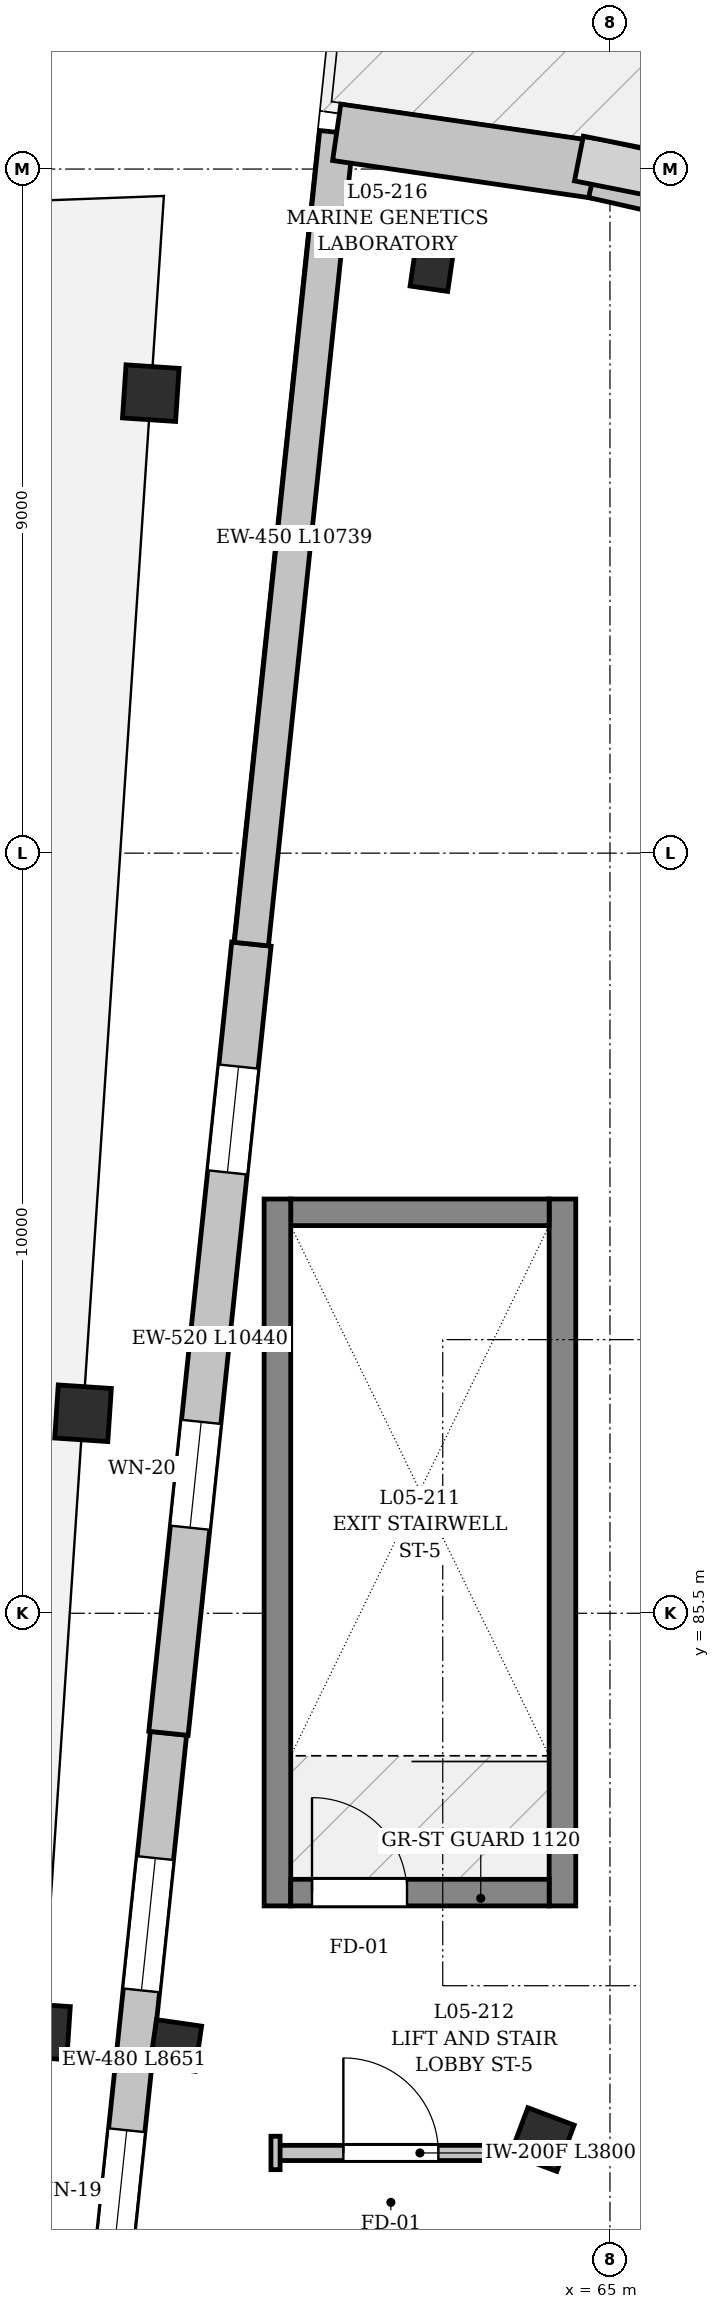
"""IFC4 building model, lengths in metres.
Left out: names, types, materials, properties, quantities, classifications, styles, units other than length and angle.
Written with IfcOpenShell. Run it as: python <this file> out.ifc"""

import sys

from ifc_helpers import new_model, si_unit, direction, frame, frame_2d, origin, origin_2d, place, context, subcontext, project, spatial, rectangle, extrude, element, fill, save


model = new_model("IFC4")
c1 = context("Model", 3, precision=1e-05, world=origin(), true_north=direction((0.0, 1.0)))
c2 = subcontext(c1, "Body", "Model", "MODEL_VIEW")
j1 = project(units=[si_unit("LENGTHUNIT", "METRE"), si_unit("PLANEANGLEUNIT", "RADIAN")], contexts=[c1])
p1 = place(None, origin())
s1 = spatial("IfcSite", under=j1, at=p1, CompositionType="ELEMENT")
p2 = place(p1, origin())
s2 = spatial("IfcBuilding", under=s1, at=p2, CompositionType="ELEMENT")
p3 = place(p2, frame((0.0, 0.0, 19.8)))
s3 = spatial("IfcBuildingStorey", under=s2, at=p3, CompositionType="ELEMENT", Elevation=19.8)
p4 = place(p3, frame((64.11, 78.576, 0.0), z_axis=(0.0, 0.0, 1.0), x_axis=(0.351841648405, 0.936059535739, 0.0)))
e1 = element("IfcColumn", 1, at=p4, inside=s3, PredefinedType="COLUMN", context=c2, shape_type="SweptSolid", body=[
    extrude(rectangle(XDim=0.65, YDim=0.65, at=origin_2d()), origin(), (0.0, 0.0, 1.0), 4.58),
])
p5 = place(p3, frame((59.288, 79.814, 0.0), z_axis=(0.0, 0.0, 1.0), x_axis=(0.142628933706, 0.989776230908, 0.0)))
e2 = element("IfcColumn", 2, at=p5, inside=s3, PredefinedType="COLUMN", context=c2, shape_type="SweptSolid", body=[
    extrude(rectangle(XDim=0.6, YDim=0.6, at=origin_2d()), origin(), (0.0, 0.0, 1.0), 4.58),
])
p6 = place(p3, frame((62.654, 103.173, 0.0), z_axis=(0.0, 0.0, 1.0), x_axis=(0.142628933706, 0.989776230908, 0.0)))
e3 = element("IfcColumn", 3, at=p6, inside=s3, PredefinedType="COLUMN", context=c2, shape_type="SweptSolid", body=[
    extrude(rectangle(XDim=0.5, YDim=0.5, at=origin_2d()), origin(), (0.0, 0.0, 1.0), 4.58),
])
p7 = place(p3, frame((58.959, 101.552, -0.22), z_axis=(0.0, 0.0, 1.0), x_axis=(0.0662739004, 0.997801468292, 0.0)))
e4 = element("IfcColumn", 4, at=p7, inside=s3, PredefinedType="COLUMN", context=c2, shape_type="SweptSolid", body=[
    extrude(rectangle(XDim=0.7, YDim=0.7, at=origin_2d()), origin(), (0.0, 0.0, 1.0), 3.153),
])
p8 = place(p3, frame((57.528, 79.999, -0.22), z_axis=(0.0, 0.0, 1.0), x_axis=(0.0662739004, 0.997801468292, 0.0)))
e5 = element("IfcColumn", 5, at=p8, inside=s3, PredefinedType="COLUMN", context=c2, shape_type="SweptSolid", body=[
    extrude(rectangle(XDim=0.7, YDim=0.7, at=origin_2d()), origin(), (0.0, 0.0, 1.0), 0.845),
])
p9 = place(p3, frame((58.068, 88.131, -0.22), z_axis=(0.0, 0.0, 1.0), x_axis=(0.0662739004, 0.997801468292, 0.0)))
e6 = element("IfcColumn", 6, at=p9, inside=s3, PredefinedType="COLUMN", context=c2, shape_type="SweptSolid", body=[
    extrude(rectangle(XDim=0.7, YDim=0.7, at=origin_2d()), origin(), (0.0, 0.0, 1.0), 1.716),
])
p10 = place(p2, frame((0.0, 0.0, 15.0)))
s4 = spatial("IfcBuildingStorey", under=s2, at=p10, CompositionType="ELEMENT", Elevation=15.0)
p11 = place(p10, frame((60.37, 102.978, 0.0), z_axis=(0.0, 0.0, 1.0), x_axis=(-0.104525478139, -0.994522209113, 0.0)))
e7 = element("IfcWall", 7, at=p11, inside=s4, PredefinedType="SOLIDWALL", context=c2, shape_type="SweptSolid", body=[
    extrude(rectangle(XDim=11.328, YDim=0.48, at=frame_2d((5.664, 0.0))), origin(), (0.0, 0.0, 1.0), 6.833),
])
p12 = place(p3, frame((58.287, 75.317, 0.0), z_axis=(0.0, 0.0, 1.0), x_axis=(0.104509954637, 0.99452384053, 0.0)))
e8 = element("IfcWall", 8, at=p12, inside=s3, PredefinedType="SOLIDWALL", context=c2, shape_type="SweptSolid", body=[
    extrude(rectangle(XDim=8.65, YDim=0.48, at=frame_2d((4.325, 0.0))), origin(), (0.0, 0.0, 1.0), 5.19),
])
p13 = place(p12, frame((1.65, 0.0, 0.9)))
e9 = element("IfcOpeningElement", 9, at=p13, cuts=e8, PredefinedType="OPENING", context=c2, shape_type="SweptSolid", body=[
    extrude(rectangle(XDim=1.75, YDim=1.85, at=frame_2d((0.875, 0.925))), frame((0.0, 0.25, 0.0), z_axis=(0.0, -1.0, 0.0), x_axis=(1.0, 0.0, 0.0)), (0.0, 0.0, 1.0), 0.5),
])
p14 = place(p12, frame((5.25, 0.0, 0.9)))
e10 = element("IfcOpeningElement", 10, at=p14, cuts=e8, PredefinedType="OPENING", context=c2, shape_type="SweptSolid", body=[
    extrude(rectangle(XDim=1.75, YDim=1.85, at=frame_2d((0.875, 0.925))), frame((0.0, 0.25, 0.0), z_axis=(0.0, -1.0, 0.0), x_axis=(1.0, 0.0, 0.0)), (0.0, 0.0, 1.0), 0.5),
])
p15 = place(p3, frame((59.191, 83.92, 0.0), z_axis=(0.0, 0.0, 1.0), x_axis=(0.10452654069, 0.994522097437, 0.0)))
e11 = element("IfcWall", 11, at=p15, inside=s3, PredefinedType="SOLIDWALL", context=c2, shape_type="SweptSolid", body=[
    extrude(rectangle(XDim=10.44, YDim=0.52, at=frame_2d((5.22, 0.0))), origin(), (0.0, 0.0, 1.0), 5.475),
])
p16 = place(p15, frame((2.72, 0.0, 0.9)))
e12 = element("IfcOpeningElement", 12, at=p16, cuts=e11, PredefinedType="OPENING", context=c2, shape_type="SweptSolid", body=[
    extrude(rectangle(XDim=1.4, YDim=2.05, at=frame_2d((0.7, 1.025))), frame((0.0, 0.27, 0.0), z_axis=(0.0, -1.0, 0.0), x_axis=(1.0, 0.0, 0.0)), (0.0, 0.0, 1.0), 0.54),
])
p17 = place(p15, frame((7.42, 0.0, 0.9)))
e13 = element("IfcOpeningElement", 13, at=p17, cuts=e11, PredefinedType="OPENING", context=c2, shape_type="SweptSolid", body=[
    extrude(rectangle(XDim=1.4, YDim=2.05, at=frame_2d((0.7, 1.025))), frame((0.0, 0.27, 0.0), z_axis=(0.0, -1.0, 0.0), x_axis=(1.0, 0.0, 0.0)), (0.0, 0.0, 1.0), 0.54),
])
p18 = place(p3, frame((60.283, 94.304, 0.0), z_axis=(0.0, 0.0, 1.0), x_axis=(0.104535666462, 0.994521138256, 0.0)))
e14 = element("IfcWall", 14, at=p18, inside=s3, PredefinedType="SOLIDWALL", context=c2, shape_type="SweptSolid", body=[
    extrude(rectangle(XDim=10.739, YDim=0.45, at=frame_2d((5.369, 0.0))), origin(), (0.0, 0.0, 1.0), 5.85),
])
p19 = place(p3, frame((61.405, 104.983, 0.0), z_axis=(0.0, 0.0, 1.0), x_axis=(0.989654305804, -0.143472488666, 0.0)))
e15 = element("IfcWall", 15, at=p19, inside=s3, PredefinedType="SOLIDWALL", context=c2, shape_type="SweptSolid", body=[
    extrude(rectangle(XDim=3.432, YDim=0.75, at=frame_2d((1.716, 0.0))), origin(), (0.0, 0.0, 1.0), 4.875),
])
p20 = place(p3, frame((64.802, 104.491, 0.0), z_axis=(0.0, 0.0, 1.0), x_axis=(0.975346772392, -0.220677759604, 0.0)))
e16 = element("IfcWall", 16, at=p20, inside=s3, PredefinedType="SOLIDWALL", context=c2, shape_type="SweptSolid", body=[
    extrude(rectangle(XDim=3.792, YDim=0.75, at=frame_2d((1.896, 0.0))), origin(), (0.0, 0.0, 1.0), 6.237),
])
p21 = place(p20, frame((1.071, 0.0, 0.0)))
e17 = element("IfcOpeningElement", 17, at=p21, cuts=e16, PredefinedType="OPENING", context=c2, shape_type="SweptSolid", body=[
    extrude(rectangle(XDim=1.65, YDim=2.4, at=frame_2d((0.825, 1.2))), frame((0.0, 0.385, 0.0), z_axis=(0.0, -1.0, 0.0), x_axis=(1.0, 0.0, 0.0)), (0.0, 0.0, 1.0), 0.77),
])
p22 = place(p3, frame((64.375, 81.65, 0.0), z_axis=(0.0, 0.0, 1.0), x_axis=(0.0, 1.0, 0.0)))
e18 = element("IfcWall", 18, at=p22, inside=s3, PredefinedType="SHEAR", context=c2, shape_type="SweptSolid", body=[
    extrude(rectangle(XDim=9.3, YDim=0.35, at=frame_2d((4.65, 0.0))), origin(), (0.0, 0.0, 1.0), 3.6),
])
p23 = place(p3, frame((64.2, 90.775, 0.0), z_axis=(0.0, 0.0, 1.0), x_axis=(-1.0, 0.0, 0.0)))
e19 = element("IfcWall", 19, at=p23, inside=s3, PredefinedType="SHEAR", context=c2, shape_type="SweptSolid", body=[
    extrude(rectangle(XDim=3.4, YDim=0.35, at=frame_2d((1.7, 0.0))), origin(), (0.0, 0.0, 1.0), 3.6),
])
p24 = place(p3, frame((60.625, 90.95, 0.0), z_axis=(0.0, 0.0, 1.0), x_axis=(0.0, -1.0, 0.0)))
e20 = element("IfcWall", 20, at=p24, inside=s3, PredefinedType="SHEAR", context=c2, shape_type="SweptSolid", body=[
    extrude(rectangle(XDim=9.3, YDim=0.35, at=frame_2d((4.65, 0.0))), origin(), (0.0, 0.0, 1.0), 3.6),
])
p25 = place(p3, frame((60.8, 81.825, 0.0), z_axis=(0.0, 0.0, 1.0), x_axis=(1.0, 0.0, 0.0)))
e21 = element("IfcWall", 21, at=p25, inside=s3, PredefinedType="SHEAR", context=c2, shape_type="SweptSolid", body=[
    extrude(rectangle(XDim=3.4, YDim=0.35, at=frame_2d((1.7, 0.0))), origin(), (0.0, 0.0, 1.0), 3.6),
])
p26 = place(p25, frame((0.28, 0.0, 0.0)))
e22 = element("IfcOpeningElement", 22, at=p26, cuts=e21, PredefinedType="OPENING", context=c2, shape_type="SweptSolid", body=[
    extrude(rectangle(XDim=1.25, YDim=2.2, at=frame_2d((0.625, 1.1))), frame((0.0, 0.185, 0.0), z_axis=(0.0, -1.0, 0.0), x_axis=(1.0, 0.0, 0.0)), (0.0, 0.0, 1.0), 0.37),
])
p27 = place(p3, frame((60.6, 78.4, 0.0), z_axis=(0.0, 0.0, 1.0), x_axis=(1.0, 0.0, 0.0)))
e23 = element("IfcWall", 23, at=p27, inside=s3, PredefinedType="PARTITIONING", context=c2, shape_type="SweptSolid", body=[
    extrude(rectangle(XDim=3.8, YDim=0.2, at=frame_2d((1.9, 0.0))), origin(), (0.0, 0.0, 1.0), 3.55),
])
p28 = place(p27, frame((0.893, 0.0, 0.0)))
e24 = element("IfcOpeningElement", 24, at=p28, cuts=e23, PredefinedType="OPENING", context=c2, shape_type="SweptSolid", body=[
    extrude(rectangle(XDim=1.25, YDim=2.2, at=frame_2d((0.625, 1.1))), frame((0.0, 0.11, 0.0), z_axis=(0.0, -1.0, 0.0), x_axis=(1.0, 0.0, 0.0)), (0.0, 0.0, 1.0), 0.22),
])
p29 = place(p3, frame((60.6, 78.18, 0.0), z_axis=(0.0, 0.0, 1.0), x_axis=(0.0, 1.0, 0.0)))
e25 = element("IfcWall", 25, at=p29, inside=s3, PredefinedType="PARTITIONING", context=c2, shape_type="SweptSolid", body=[
    extrude(rectangle(XDim=0.44, YDim=0.12, at=frame_2d((0.22, 0.0))), origin(), (0.0, 0.0, 1.0), 3.55),
])
p30 = place(p13, origin())
e26 = element("IfcWindow", 26, at=p30, inside=s3, PartitioningType="DOUBLE_PANEL_VERTICAL", PredefinedType="WINDOW", context=c2, shape_type="SweptSolid", body=[
    extrude(rectangle(XDim=1.75, YDim=1.85, at=frame_2d((0.875, 0.925))), frame((0.0, 0.03, 0.0), z_axis=(0.0, -1.0, 0.0), x_axis=(1.0, 0.0, 0.0)), (0.0, 0.0, 1.0), 0.06),
])
fill(e9, e26)
p31 = place(p14, origin())
e27 = element("IfcWindow", 27, at=p31, inside=s3, PartitioningType="DOUBLE_PANEL_VERTICAL", PredefinedType="WINDOW", context=c2, shape_type="SweptSolid", body=[
    extrude(rectangle(XDim=1.75, YDim=1.85, at=frame_2d((0.875, 0.925))), frame((0.0, 0.03, 0.0), z_axis=(0.0, -1.0, 0.0), x_axis=(1.0, 0.0, 0.0)), (0.0, 0.0, 1.0), 0.06),
])
fill(e10, e27)
p32 = place(p16, origin())
e28 = element("IfcWindow", 28, at=p32, inside=s3, PartitioningType="DOUBLE_PANEL_VERTICAL", PredefinedType="WINDOW", context=c2, shape_type="SweptSolid", body=[
    extrude(rectangle(XDim=1.4, YDim=2.05, at=frame_2d((0.7, 1.025))), frame((0.0, 0.03, 0.0), z_axis=(0.0, -1.0, 0.0), x_axis=(1.0, 0.0, 0.0)), (0.0, 0.0, 1.0), 0.06),
])
fill(e12, e28)
p33 = place(p17, origin())
e29 = element("IfcWindow", 29, at=p33, inside=s3, PartitioningType="DOUBLE_PANEL_VERTICAL", PredefinedType="WINDOW", context=c2, shape_type="SweptSolid", body=[
    extrude(rectangle(XDim=1.4, YDim=2.05, at=frame_2d((0.7, 1.025))), frame((0.0, 0.03, 0.0), z_axis=(0.0, -1.0, 0.0), x_axis=(1.0, 0.0, 0.0)), (0.0, 0.0, 1.0), 0.06),
])
fill(e13, e29)
p34 = place(p26, origin())
e30 = element("IfcDoor", 30, at=p34, inside=s3, OperationType="SINGLE_SWING_RIGHT", PredefinedType="DOOR", context=c2, shape_type="SweptSolid", body=[
    extrude(rectangle(XDim=1.25, YDim=2.2, at=frame_2d((0.625, 1.1))), frame((0.0, 0.025, 0.0), z_axis=(0.0, -1.0, 0.0), x_axis=(1.0, 0.0, 0.0)), (0.0, 0.0, 1.0), 0.05),
])
fill(e22, e30)
p35 = place(p28, origin())
e31 = element("IfcDoor", 31, at=p35, inside=s3, OperationType="SINGLE_SWING_LEFT", PredefinedType="DOOR", context=c2, shape_type="SweptSolid", body=[
    extrude(rectangle(XDim=1.25, YDim=2.2, at=frame_2d((0.625, 1.1))), frame((0.0, 0.025, 0.0), z_axis=(0.0, -1.0, 0.0), x_axis=(1.0, 0.0, 0.0)), (0.0, 0.0, 1.0), 0.05),
])
fill(e24, e31)
save(model, sys.argv[1])
